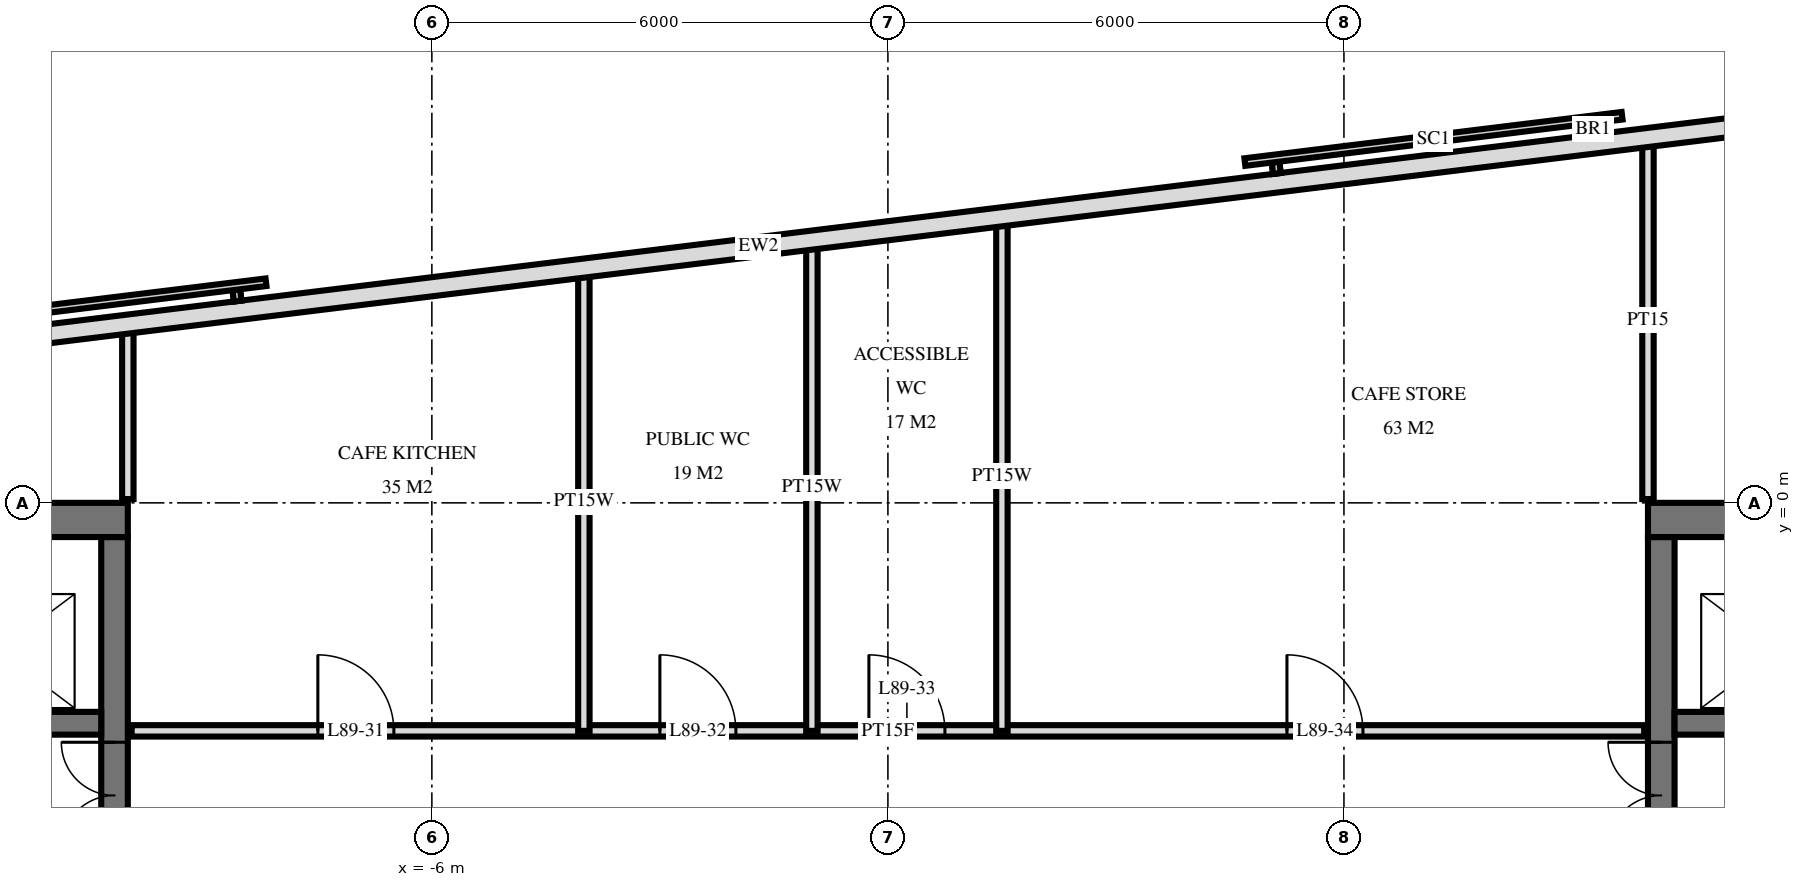
"""IFC4 building model, lengths in metres.
Left out: names, types, materials, properties, quantities, classifications, styles, units other than length and angle.
Written with IfcOpenShell. Run it as: python <this file> out.ifc"""

import sys

from ifc_helpers import new_model, si_unit, direction, frame, frame_2d, origin, place, context, subcontext, project, spatial, rectangle, extrude, element, fill, save


model = new_model("IFC4")
c1 = context("Model", 3, precision=1e-05, world=origin(), true_north=direction((0.0, 1.0)))
c2 = subcontext(c1, "Body", "Model", "MODEL_VIEW")
j1 = project(units=[si_unit("LENGTHUNIT", "METRE"), si_unit("PLANEANGLEUNIT", "RADIAN")], contexts=[c1])
p1 = place(None, origin())
s1 = spatial("IfcSite", under=j1, at=p1, CompositionType="ELEMENT")
p2 = place(p1, origin())
s2 = spatial("IfcBuilding", under=s1, at=p2, CompositionType="ELEMENT")
p3 = place(p2, frame((0.0, 0.0, 338.6)))
s3 = spatial("IfcBuildingStorey", under=s2, at=p3, CompositionType="ELEMENT", Elevation=338.6)
p4 = place(p3, frame((-19.5, -0.225, 0.0), z_axis=(0.0, 0.0, 1.0), x_axis=(1.0, 0.0, 0.0)))
e1 = element("IfcWall", 1, at=p4, inside=s3, PredefinedType="SHEAR", context=c2, shape_type="SweptSolid", body=[
    extrude(rectangle(XDim=9.5, YDim=0.45, at=frame_2d((4.75, 0.0))), origin(), (0.0, 0.0, 1.0), 4.0),
])
p5 = place(p3, frame((-10.175, -14.55, 0.0), z_axis=(0.0, 0.0, 1.0), x_axis=(0.0, 1.0, 0.0)))
e2 = element("IfcWall", 2, at=p5, inside=s3, PredefinedType="SHEAR", context=c2, shape_type="SweptSolid", body=[
    extrude(rectangle(XDim=14.1, YDim=0.35, at=frame_2d((7.05, 0.0))), origin(), (0.0, 0.0, 1.0), 4.0),
])
p6 = place(p5, frame((8.4, 0.0, 0.0)))
e3 = element("IfcOpeningElement", 3, at=p6, cuts=e2, PredefinedType="OPENING", context=c2, shape_type="SweptSolid", body=[
    extrude(rectangle(XDim=1.4, YDim=2.4, at=frame_2d((0.7, 1.2))), frame((0.0, 0.185, 0.0), z_axis=(0.0, -1.0, 0.0), x_axis=(1.0, 0.0, 0.0)), (0.0, 0.0, 1.0), 0.37),
])
p7 = place(p5, frame((10.0, 0.0, 0.0)))
e4 = element("IfcOpeningElement", 4, at=p7, cuts=e2, PredefinedType="OPENING", context=c2, shape_type="SweptSolid", body=[
    extrude(rectangle(XDim=1.4, YDim=2.4, at=frame_2d((0.7, 1.2))), frame((0.0, 0.185, 0.0), z_axis=(0.0, -1.0, 0.0), x_axis=(1.0, 0.0, 0.0)), (0.0, 0.0, 1.0), 0.37),
])
p8 = place(p5, frame((4.0, 0.0, 0.0)))
e5 = element("IfcOpeningElement", 5, at=p8, cuts=e2, PredefinedType="OPENING", context=c2, shape_type="SweptSolid", body=[
    extrude(rectangle(XDim=1.2, YDim=2.1, at=frame_2d((0.6, 1.05))), frame((0.0, 0.185, 0.0), z_axis=(0.0, -1.0, 0.0), x_axis=(1.0, 0.0, 0.0)), (0.0, 0.0, 1.0), 0.37),
])
p9 = place(p3, frame((-19.05, -2.9, 0.0), z_axis=(0.0, 0.0, 1.0), x_axis=(1.0, 0.0, 0.0)))
e6 = element("IfcWall", 6, at=p9, inside=s3, PredefinedType="SHEAR", context=c2, shape_type="SweptSolid", body=[
    extrude(rectangle(XDim=8.7, YDim=0.3, at=frame_2d((4.35, 0.0))), origin(), (0.0, 0.0, 1.0), 4.0),
])
p10 = place(p9, frame((6.8, 0.0, 0.0)))
e7 = element("IfcOpeningElement", 7, at=p10, cuts=e6, PredefinedType="OPENING", context=c2, shape_type="SweptSolid", body=[
    extrude(rectangle(XDim=1.1, YDim=2.1, at=frame_2d((0.55, 1.05))), frame((0.0, 0.16, 0.0), z_axis=(0.0, -1.0, 0.0), x_axis=(1.0, 0.0, 0.0)), (0.0, 0.0, 1.0), 0.32),
])
p11 = place(p9, frame((3.8, 0.0, 0.0)))
e8 = element("IfcOpeningElement", 8, at=p11, cuts=e6, PredefinedType="OPENING", context=c2, shape_type="SweptSolid", body=[
    extrude(rectangle(XDim=1.1, YDim=2.1, at=frame_2d((0.55, 1.05))), frame((0.0, 0.16, 0.0), z_axis=(0.0, -1.0, 0.0), x_axis=(1.0, 0.0, 0.0)), (0.0, 0.0, 1.0), 0.32),
])
p12 = place(p9, frame((1.613, 0.0, 0.0)))
e9 = element("IfcOpeningElement", 9, at=p12, cuts=e6, PredefinedType="OPENING", context=c2, shape_type="SweptSolid", body=[
    extrude(rectangle(XDim=0.9, YDim=2.1, at=frame_2d((0.45, 1.05))), frame((0.0, 0.16, 0.0), z_axis=(0.0, -1.0, 0.0), x_axis=(1.0, 0.0, 0.0)), (0.0, 0.0, 1.0), 0.32),
])
p13 = place(p9, frame((0.188, 0.0, 0.0)))
e10 = element("IfcOpeningElement", 10, at=p13, cuts=e6, PredefinedType="OPENING", context=c2, shape_type="SweptSolid", body=[
    extrude(rectangle(XDim=0.9, YDim=2.1, at=frame_2d((0.45, 1.05))), frame((0.0, 0.16, 0.0), z_axis=(0.0, -1.0, 0.0), x_axis=(1.0, 0.0, 0.0)), (0.0, 0.0, 1.0), 0.32),
])
p14 = place(p3, frame((10.0, -0.225, 0.0), z_axis=(0.0, 0.0, 1.0), x_axis=(1.0, 0.0, 0.0)))
e11 = element("IfcWall", 11, at=p14, inside=s3, PredefinedType="SHEAR", context=c2, shape_type="SweptSolid", body=[
    extrude(rectangle(XDim=9.5, YDim=0.45, at=frame_2d((4.75, 0.0))), origin(), (0.0, 0.0, 1.0), 4.0),
])
p15 = place(p3, frame((10.175, -14.55, 0.0), z_axis=(0.0, 0.0, 1.0), x_axis=(0.0, 1.0, 0.0)))
e12 = element("IfcWall", 12, at=p15, inside=s3, PredefinedType="SHEAR", context=c2, shape_type="SweptSolid", body=[
    extrude(rectangle(XDim=14.1, YDim=0.35, at=frame_2d((7.05, 0.0))), origin(), (0.0, 0.0, 1.0), 4.0),
])
p16 = place(p15, frame((8.4, 0.0, 0.0)))
e13 = element("IfcOpeningElement", 13, at=p16, cuts=e12, PredefinedType="OPENING", context=c2, shape_type="SweptSolid", body=[
    extrude(rectangle(XDim=1.4, YDim=2.4, at=frame_2d((0.7, 1.2))), frame((0.0, 0.185, 0.0), z_axis=(0.0, -1.0, 0.0), x_axis=(1.0, 0.0, 0.0)), (0.0, 0.0, 1.0), 0.37),
])
p17 = place(p15, frame((10.0, 0.0, 0.0)))
e14 = element("IfcOpeningElement", 14, at=p17, cuts=e12, PredefinedType="OPENING", context=c2, shape_type="SweptSolid", body=[
    extrude(rectangle(XDim=1.4, YDim=2.4, at=frame_2d((0.7, 1.2))), frame((0.0, 0.185, 0.0), z_axis=(0.0, -1.0, 0.0), x_axis=(1.0, 0.0, 0.0)), (0.0, 0.0, 1.0), 0.37),
])
p18 = place(p15, frame((4.0, 0.0, 0.0)))
e15 = element("IfcOpeningElement", 15, at=p18, cuts=e12, PredefinedType="OPENING", context=c2, shape_type="SweptSolid", body=[
    extrude(rectangle(XDim=1.2, YDim=2.1, at=frame_2d((0.6, 1.05))), frame((0.0, 0.185, 0.0), z_axis=(0.0, -1.0, 0.0), x_axis=(1.0, 0.0, 0.0)), (0.0, 0.0, 1.0), 0.37),
])
p19 = place(p3, frame((10.35, -2.9, 0.0), z_axis=(0.0, 0.0, 1.0), x_axis=(1.0, 0.0, 0.0)))
e16 = element("IfcWall", 16, at=p19, inside=s3, PredefinedType="SHEAR", context=c2, shape_type="SweptSolid", body=[
    extrude(rectangle(XDim=8.7, YDim=0.3, at=frame_2d((4.35, 0.0))), origin(), (0.0, 0.0, 1.0), 4.0),
])
p20 = place(p19, frame((0.8, 0.0, 0.0)))
e17 = element("IfcOpeningElement", 17, at=p20, cuts=e16, PredefinedType="OPENING", context=c2, shape_type="SweptSolid", body=[
    extrude(rectangle(XDim=1.1, YDim=2.1, at=frame_2d((0.55, 1.05))), frame((0.0, 0.16, 0.0), z_axis=(0.0, -1.0, 0.0), x_axis=(1.0, 0.0, 0.0)), (0.0, 0.0, 1.0), 0.32),
])
p21 = place(p19, frame((3.8, 0.0, 0.0)))
e18 = element("IfcOpeningElement", 18, at=p21, cuts=e16, PredefinedType="OPENING", context=c2, shape_type="SweptSolid", body=[
    extrude(rectangle(XDim=1.1, YDim=2.1, at=frame_2d((0.55, 1.05))), frame((0.0, 0.16, 0.0), z_axis=(0.0, -1.0, 0.0), x_axis=(1.0, 0.0, 0.0)), (0.0, 0.0, 1.0), 0.32),
])
p22 = place(p19, frame((6.188, 0.0, 0.0)))
e19 = element("IfcOpeningElement", 19, at=p22, cuts=e16, PredefinedType="OPENING", context=c2, shape_type="SweptSolid", body=[
    extrude(rectangle(XDim=0.9, YDim=2.1, at=frame_2d((0.45, 1.05))), frame((0.0, 0.16, 0.0), z_axis=(0.0, -1.0, 0.0), x_axis=(1.0, 0.0, 0.0)), (0.0, 0.0, 1.0), 0.32),
])
p23 = place(p19, frame((7.613, 0.0, 0.0)))
e20 = element("IfcOpeningElement", 20, at=p23, cuts=e16, PredefinedType="OPENING", context=c2, shape_type="SweptSolid", body=[
    extrude(rectangle(XDim=0.9, YDim=2.1, at=frame_2d((0.45, 1.05))), frame((0.0, 0.16, 0.0), z_axis=(0.0, -1.0, 0.0), x_axis=(1.0, 0.0, 0.0)), (0.0, 0.0, 1.0), 0.32),
])
p24 = place(p3, frame((16.138, 5.561, 0.0), z_axis=(0.0, 0.0, 1.0), x_axis=(-0.992546726876, -0.121864658405, 0.0)))
e21 = element("IfcWall", 21, at=p24, inside=s3, PredefinedType="SOLIDWALL", context=c2, shape_type="SweptSolid", body=[
    extrude(rectangle(XDim=35.951, YDim=0.25, at=frame_2d((17.975, 0.0))), origin(), (0.0, 0.0, 1.0), 3.72),
])
p25 = place(p3, frame((10.0, 0.05, 0.0), z_axis=(0.0, 0.0, 1.0), x_axis=(0.0, 1.0, 0.0)))
e22 = element("IfcWall", 22, at=p25, inside=s3, PredefinedType="PARTITIONING", context=c2, shape_type="SweptSolid", body=[
    extrude(rectangle(XDim=4.702, YDim=0.15, at=frame_2d((2.351, 0.0))), origin(), (0.0, 0.0, 1.0), 3.72),
])
p26 = place(p3, frame((1.5, -3.0, 0.0), z_axis=(0.0, 0.0, 1.0), x_axis=(0.0, 1.0, 0.0)))
e23 = element("IfcWall", 23, at=p26, inside=s3, PredefinedType="PLUMBINGWALL", context=c2, shape_type="SweptSolid", body=[
    extrude(rectangle(XDim=6.709, YDim=0.15, at=frame_2d((3.354, 0.0))), origin(), (0.0, 0.0, 1.0), 3.72),
])
p27 = place(p3, frame((-1.0, -3.0, 0.0), z_axis=(0.0, 0.0, 1.0), x_axis=(0.0, 1.0, 0.0)))
e24 = element("IfcWall", 24, at=p27, inside=s3, PredefinedType="PLUMBINGWALL", context=c2, shape_type="SweptSolid", body=[
    extrude(rectangle(XDim=6.402, YDim=0.15, at=frame_2d((3.201, 0.0))), origin(), (0.0, 0.0, 1.0), 3.72),
])
p28 = place(p3, frame((-4.0, -3.0, 0.0), z_axis=(0.0, 0.0, 1.0), x_axis=(0.0, 1.0, 0.0)))
e25 = element("IfcWall", 25, at=p28, inside=s3, PredefinedType="PLUMBINGWALL", context=c2, shape_type="SweptSolid", body=[
    extrude(rectangle(XDim=6.033, YDim=0.15, at=frame_2d((3.017, 0.0))), origin(), (0.0, 0.0, 1.0), 3.72),
])
p29 = place(p3, frame((-10.0, 0.05, 0.0), z_axis=(0.0, 0.0, 1.0), x_axis=(0.0, 1.0, 0.0)))
e26 = element("IfcWall", 26, at=p29, inside=s3, PredefinedType="PARTITIONING", context=c2, shape_type="SweptSolid", body=[
    extrude(rectangle(XDim=2.247, YDim=0.15, at=frame_2d((1.123, 0.0))), origin(), (0.0, 0.0, 1.0), 3.72),
])
p30 = place(p3, frame((-9.95, -3.0, 0.0), z_axis=(0.0, 0.0, 1.0), x_axis=(1.0, 0.0, 0.0)))
e27 = element("IfcWall", 27, at=p30, inside=s3, PredefinedType="PARTITIONING", context=c2, shape_type="SweptSolid", body=[
    extrude(rectangle(XDim=19.9, YDim=0.15, at=frame_2d((9.95, 0.0))), origin(), (0.0, 0.0, 1.0), 3.72),
])
p31 = place(p30, frame((2.45, 0.0, 0.0)))
e28 = element("IfcOpeningElement", 28, at=p31, cuts=e27, PredefinedType="OPENING", context=c2, shape_type="SweptSolid", body=[
    extrude(rectangle(XDim=1.0, YDim=2.1, at=frame_2d((0.5, 1.05))), frame((0.0, 0.085, 0.0), z_axis=(0.0, -1.0, 0.0), x_axis=(1.0, 0.0, 0.0)), (0.0, 0.0, 1.0), 0.17),
])
p32 = place(p30, frame((6.95, 0.0, 0.0)))
e29 = element("IfcOpeningElement", 29, at=p32, cuts=e27, PredefinedType="OPENING", context=c2, shape_type="SweptSolid", body=[
    extrude(rectangle(XDim=1.0, YDim=2.1, at=frame_2d((0.5, 1.05))), frame((0.0, 0.085, 0.0), z_axis=(0.0, -1.0, 0.0), x_axis=(1.0, 0.0, 0.0)), (0.0, 0.0, 1.0), 0.17),
])
p33 = place(p30, frame((9.7, 0.0, 0.0)))
e30 = element("IfcOpeningElement", 30, at=p33, cuts=e27, PredefinedType="OPENING", context=c2, shape_type="SweptSolid", body=[
    extrude(rectangle(XDim=1.0, YDim=2.1, at=frame_2d((0.5, 1.05))), frame((0.0, 0.085, 0.0), z_axis=(0.0, -1.0, 0.0), x_axis=(1.0, 0.0, 0.0)), (0.0, 0.0, 1.0), 0.17),
])
p34 = place(p30, frame((15.2, 0.0, 0.0)))
e31 = element("IfcOpeningElement", 31, at=p34, cuts=e27, PredefinedType="OPENING", context=c2, shape_type="SweptSolid", body=[
    extrude(rectangle(XDim=1.0, YDim=2.1, at=frame_2d((0.5, 1.05))), frame((0.0, 0.085, 0.0), z_axis=(0.0, -1.0, 0.0), x_axis=(1.0, 0.0, 0.0)), (0.0, 0.0, 1.0), 0.17),
])
p35 = place(p7, origin())
e32 = element("IfcDoor", 32, at=p35, inside=s3, OperationType="DOUBLE_DOOR_SINGLE_SWING", PredefinedType="DOOR", context=c2, shape_type="SweptSolid", body=[
    extrude(rectangle(XDim=1.4, YDim=2.4, at=frame_2d((0.7, 1.2))), frame((0.0, 0.025, 0.0), z_axis=(0.0, -1.0, 0.0), x_axis=(1.0, 0.0, 0.0)), (0.0, 0.0, 1.0), 0.05),
])
fill(e4, e32)
p36 = place(p17, origin())
e33 = element("IfcDoor", 33, at=p36, inside=s3, OperationType="DOUBLE_DOOR_SINGLE_SWING", PredefinedType="DOOR", context=c2, shape_type="SweptSolid", body=[
    extrude(rectangle(XDim=1.4, YDim=2.4, at=frame_2d((0.7, 1.2))), frame((0.0, 0.025, 0.0), z_axis=(0.0, -1.0, 0.0), x_axis=(1.0, 0.0, 0.0)), (0.0, 0.0, 1.0), 0.05),
])
fill(e14, e33)
p37 = place(p31, origin())
e34 = element("IfcDoor", 34, at=p37, inside=s3, OperationType="SINGLE_SWING_RIGHT", PredefinedType="DOOR", context=c2, shape_type="SweptSolid", body=[
    extrude(rectangle(XDim=1.0, YDim=2.1, at=frame_2d((0.5, 1.05))), frame((0.0, 0.025, 0.0), z_axis=(0.0, -1.0, 0.0), x_axis=(1.0, 0.0, 0.0)), (0.0, 0.0, 1.0), 0.05),
])
fill(e28, e34)
p38 = place(p32, origin())
e35 = element("IfcDoor", 35, at=p38, inside=s3, OperationType="SINGLE_SWING_RIGHT", PredefinedType="DOOR", context=c2, shape_type="SweptSolid", body=[
    extrude(rectangle(XDim=1.0, YDim=2.1, at=frame_2d((0.5, 1.05))), frame((0.0, 0.025, 0.0), z_axis=(0.0, -1.0, 0.0), x_axis=(1.0, 0.0, 0.0)), (0.0, 0.0, 1.0), 0.05),
])
fill(e29, e35)
p39 = place(p33, origin())
e36 = element("IfcDoor", 36, at=p39, inside=s3, OperationType="SINGLE_SWING_RIGHT", PredefinedType="DOOR", context=c2, shape_type="SweptSolid", body=[
    extrude(rectangle(XDim=1.0, YDim=2.1, at=frame_2d((0.5, 1.05))), frame((0.0, 0.025, 0.0), z_axis=(0.0, -1.0, 0.0), x_axis=(1.0, 0.0, 0.0)), (0.0, 0.0, 1.0), 0.05),
])
fill(e30, e36)
p40 = place(p34, origin())
e37 = element("IfcDoor", 37, at=p40, inside=s3, OperationType="SINGLE_SWING_RIGHT", PredefinedType="DOOR", context=c2, shape_type="SweptSolid", body=[
    extrude(rectangle(XDim=1.0, YDim=2.1, at=frame_2d((0.5, 1.05))), frame((0.0, 0.025, 0.0), z_axis=(0.0, -1.0, 0.0), x_axis=(1.0, 0.0, 0.0)), (0.0, 0.0, 1.0), 0.05),
])
fill(e31, e37)
save(model, sys.argv[1])
